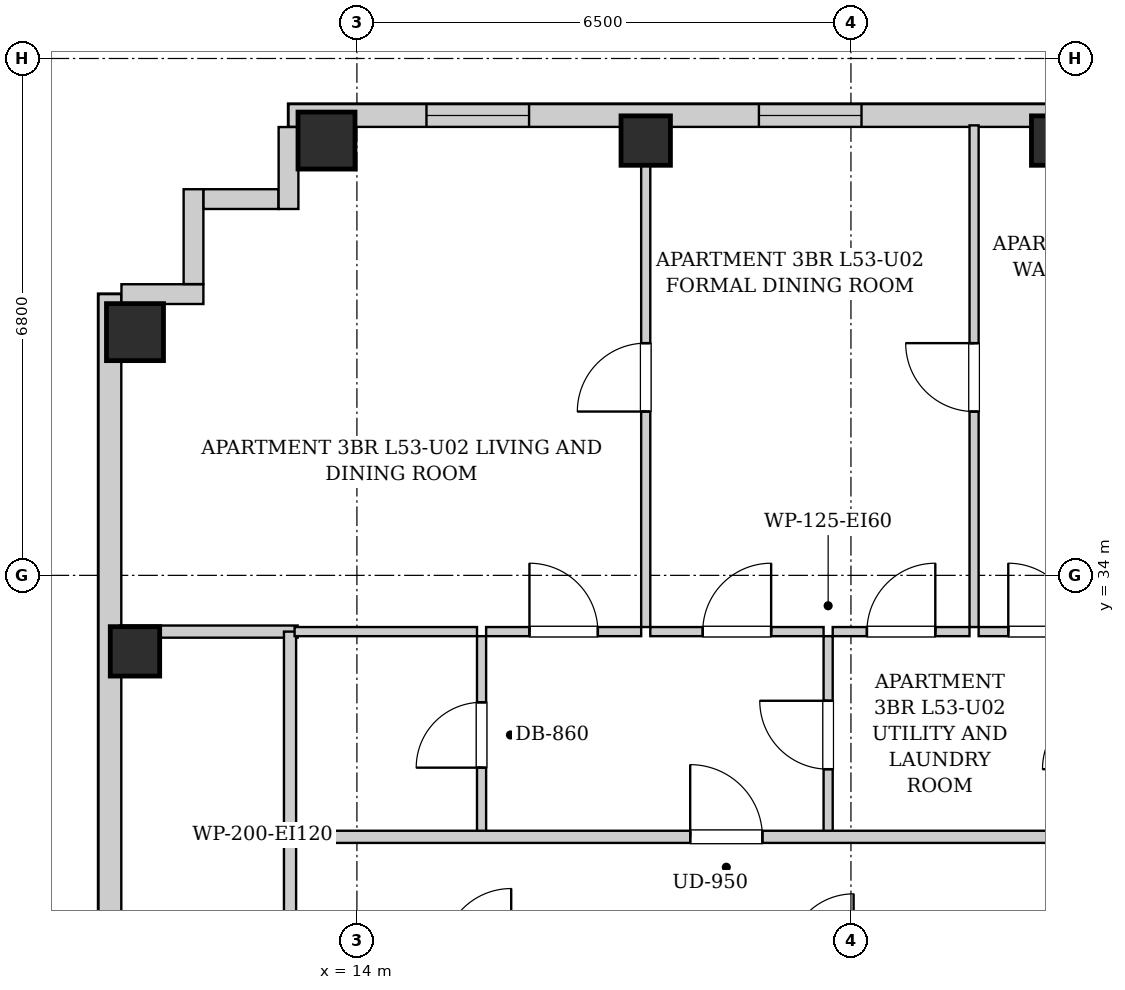
"""IFC4 building model, lengths in metres.
Left out: names, types, materials, properties, quantities, classifications, styles, units other than length and angle.
Written with IfcOpenShell. Run it as: python <this file> out.ifc"""

import sys

from ifc_helpers import new_model, si_unit, direction, frame, frame_2d, origin, origin_2d, place, context, subcontext, project, spatial, rectangle, extrude, element, fill, save


model = new_model("IFC4")
c1 = context("Model", 3, precision=1e-05, world=origin(), true_north=direction((0.0, 1.0)))
c2 = subcontext(c1, "Body", "Model", "MODEL_VIEW")
j1 = project(units=[si_unit("LENGTHUNIT", "METRE"), si_unit("PLANEANGLEUNIT", "RADIAN")], contexts=[c1])
p1 = place(None, origin())
s1 = spatial("IfcSite", under=j1, at=p1, CompositionType="ELEMENT")
p2 = place(p1, origin())
s2 = spatial("IfcBuilding", under=s1, at=p2, CompositionType="ELEMENT")
p3 = place(p2, frame((0.0, 0.0, 184.3)))
s3 = spatial("IfcBuildingStorey", under=s2, at=p3, CompositionType="ELEMENT", Elevation=184.3)
p4 = place(p3, frame((13.6, 39.72, 0.0), z_axis=(0.0, 0.0, 1.0), x_axis=(1.0, 0.0, 0.0)))
e1 = element("IfcColumn", 1, at=p4, inside=s3, PredefinedType="COLUMN", context=c2, shape_type="SweptSolid", body=[
    extrude(rectangle(XDim=0.75, YDim=0.75, at=origin_2d()), origin(), (0.0, 0.0, 1.0), 3.3),
])
for number, where, z_axis, x_axis in (
    (2, (17.8, 39.72, 0.0), (0.0, 0.0, 1.0), (1.0, 0.0, 0.0)),
    (3, (23.2, 39.72, 0.0), (0.0, 0.0, 1.0), (1.0, 0.0, 0.0)),
    (4, (11.08, 33.0, 0.0), (0.0, 0.0, 1.0), (1.0, 0.0, 0.0)),
):
    element("IfcColumn", number, at=place(p3, frame(where, z_axis=z_axis, x_axis=x_axis)), inside=s3, PredefinedType="COLUMN", context=c2, shape_type="SweptSolid", body=[
        extrude(rectangle(XDim=0.65, YDim=0.65, at=origin_2d()), origin(), (0.0, 0.0, 1.0), 3.3),
    ])
p5 = place(p3, frame((11.08, 37.2, 0.0), z_axis=(0.0, 0.0, 1.0), x_axis=(1.0, 0.0, 0.0)))
e5 = element("IfcColumn", 5, at=p5, inside=s3, PredefinedType="COLUMN", context=c2, shape_type="SweptSolid", body=[
    extrude(rectangle(XDim=0.75, YDim=0.75, at=origin_2d()), origin(), (0.0, 0.0, 1.0), 3.3),
])
p6 = place(p3, frame((13.1, 40.05, 0.0), z_axis=(0.0, 0.0, 1.0), x_axis=(1.0, 0.0, 0.0)))
e6 = element("IfcWall", 6, at=p6, inside=s3, PredefinedType="SOLIDWALL", context=c2, shape_type="SweptSolid", body=[
    extrude(rectangle(XDim=17.5, YDim=0.3, at=frame_2d((8.75, 0.0))), origin(), (0.0, 0.0, 1.0), 3.04),
])
p7 = place(p6, frame((1.815, 0.0, 0.55)))
e7 = element("IfcOpeningElement", 7, at=p7, cuts=e6, PredefinedType="OPENING", context=c2, shape_type="SweptSolid", body=[
    extrude(rectangle(XDim=1.35, YDim=1.2, at=frame_2d((0.675, 0.6))), frame((0.0, 0.16, 0.0), z_axis=(0.0, -1.0, 0.0), x_axis=(1.0, 0.0, 0.0)), (0.0, 0.0, 1.0), 0.32),
])
p8 = place(p6, frame((6.189, 0.0, 0.55)))
e8 = element("IfcOpeningElement", 8, at=p8, cuts=e6, PredefinedType="OPENING", context=c2, shape_type="SweptSolid", body=[
    extrude(rectangle(XDim=1.35, YDim=1.2, at=frame_2d((0.675, 0.6))), frame((0.0, 0.16, 0.0), z_axis=(0.0, -1.0, 0.0), x_axis=(1.0, 0.0, 0.0)), (0.0, 0.0, 1.0), 0.32),
])
p9 = place(p6, frame((14.788, 0.0, 0.55)))
e9 = element("IfcOpeningElement", 9, at=p9, cuts=e6, PredefinedType="OPENING", context=c2, shape_type="SweptSolid", body=[
    extrude(rectangle(XDim=1.35, YDim=1.2, at=frame_2d((0.675, 0.6))), frame((0.0, 0.16, 0.0), z_axis=(0.0, -1.0, 0.0), x_axis=(1.0, 0.0, 0.0)), (0.0, 0.0, 1.0), 0.32),
])
p10 = place(p3, frame((10.75, 6.3, 0.0), z_axis=(0.0, 0.0, 1.0), x_axis=(0.0, 1.0, 0.0)))
e10 = element("IfcWall", 10, at=p10, inside=s3, PredefinedType="SOLIDWALL", context=c2, shape_type="SweptSolid", body=[
    extrude(rectangle(XDim=31.4, YDim=0.3, at=frame_2d((15.7, 0.0))), origin(), (0.0, 0.0, 1.0), 3.04),
])
p11 = place(p10, frame((1.653, 0.0, 0.55)))
e11 = element("IfcOpeningElement", 11, at=p11, cuts=e10, PredefinedType="OPENING", context=c2, shape_type="SweptSolid", body=[
    extrude(rectangle(XDim=1.35, YDim=1.2, at=frame_2d((0.675, 0.6))), frame((0.0, 0.16, 0.0), z_axis=(0.0, -1.0, 0.0), x_axis=(1.0, 0.0, 0.0)), (0.0, 0.0, 1.0), 0.32),
])
p12 = place(p10, frame((11.85, 0.0, 0.55)))
e12 = element("IfcOpeningElement", 12, at=p12, cuts=e10, PredefinedType="OPENING", context=c2, shape_type="SweptSolid", body=[
    extrude(rectangle(XDim=1.35, YDim=1.2, at=frame_2d((0.675, 0.6))), frame((0.0, 0.16, 0.0), z_axis=(0.0, -1.0, 0.0), x_axis=(1.0, 0.0, 0.0)), (0.0, 0.0, 1.0), 0.32),
])
p13 = place(p10, frame((9.185, 0.0, 0.55)))
e13 = element("IfcOpeningElement", 13, at=p13, cuts=e10, PredefinedType="OPENING", context=c2, shape_type="SweptSolid", body=[
    extrude(rectangle(XDim=1.35, YDim=1.2, at=frame_2d((0.675, 0.6))), frame((0.0, 0.16, 0.0), z_axis=(0.0, -1.0, 0.0), x_axis=(1.0, 0.0, 0.0)), (0.0, 0.0, 1.0), 0.32),
])
p14 = place(p10, frame((21.209, 0.0, 0.55)))
e14 = element("IfcOpeningElement", 14, at=p14, cuts=e10, PredefinedType="OPENING", context=c2, shape_type="SweptSolid", body=[
    extrude(rectangle(XDim=0.85, YDim=1.2, at=frame_2d((0.425, 0.6))), frame((0.0, 0.16, 0.0), z_axis=(0.0, -1.0, 0.0), x_axis=(1.0, 0.0, 0.0)), (0.0, 0.0, 1.0), 0.32),
])
p15 = place(p3, frame((10.902, 37.7, 0.0), z_axis=(0.0, 0.0, 1.0), x_axis=(1.0, 0.0, 0.0)))
e15 = element("IfcWall", 15, at=p15, inside=s3, PredefinedType="SOLIDWALL", context=c2, shape_type="SweptSolid", body=[
    extrude(rectangle(XDim=1.078, YDim=0.26, at=frame_2d((0.539, 0.0))), origin(), (0.0, 0.0, 1.0), 3.04),
])
p16 = place(p3, frame((11.85, 37.832, 0.0), z_axis=(0.0, 0.0, 1.0), x_axis=(0.0, 1.0, 0.0)))
e16 = element("IfcWall", 16, at=p16, inside=s3, PredefinedType="SOLIDWALL", context=c2, shape_type="SweptSolid", body=[
    extrude(rectangle(XDim=1.248, YDim=0.26, at=frame_2d((0.624, 0.0))), origin(), (0.0, 0.0, 1.0), 3.04),
])
p17 = place(p3, frame((11.982, 38.95, 0.0), z_axis=(0.0, 0.0, 1.0), x_axis=(1.0, 0.0, 0.0)))
e17 = element("IfcWall", 17, at=p17, inside=s3, PredefinedType="SOLIDWALL", context=c2, shape_type="SweptSolid", body=[
    extrude(rectangle(XDim=0.986, YDim=0.26, at=frame_2d((0.493, 0.0))), origin(), (0.0, 0.0, 1.0), 3.04),
])
p18 = place(p3, frame((13.1, 38.82, 0.0), z_axis=(0.0, 0.0, 1.0), x_axis=(0.0, 1.0, 0.0)))
e18 = element("IfcWall", 18, at=p18, inside=s3, PredefinedType="SOLIDWALL", context=c2, shape_type="SweptSolid", body=[
    extrude(rectangle(XDim=1.078, YDim=0.26, at=frame_2d((0.539, 0.0))), origin(), (0.0, 0.0, 1.0), 3.04),
])
p19 = place(p3, frame((13.12, 28.98, 0.0), z_axis=(0.0, 0.0, 1.0), x_axis=(0.0, 1.0, 0.0)))
e19 = element("IfcWall", 19, at=p19, inside=s3, PredefinedType="PARTITIONING", context=c2, shape_type="SweptSolid", body=[
    extrude(rectangle(XDim=1.58, YDim=0.16, at=frame_2d((0.79, 0.0))), origin(), (0.0, 0.0, 1.0), 3.04),
])
p20 = place(p3, frame((10.88, 33.26, 0.0), z_axis=(0.0, 0.0, 1.0), x_axis=(1.0, 0.0, 0.0)))
e20 = element("IfcWall", 20, at=p20, inside=s3, PredefinedType="PARTITIONING", context=c2, shape_type="SweptSolid", body=[
    extrude(rectangle(XDim=2.34, YDim=0.16, at=frame_2d((1.17, 0.0))), origin(), (0.0, 0.0, 1.0), 3.04),
])
p21 = place(p3, frame((13.12, 30.6, 0.0), z_axis=(0.0, 0.0, 1.0), x_axis=(0.0, 1.0, 0.0)))
e21 = element("IfcWall", 21, at=p21, inside=s3, PredefinedType="PARTITIONING", context=c2, shape_type="SweptSolid", body=[
    extrude(rectangle(XDim=2.66, YDim=0.16, at=frame_2d((1.33, 0.0))), origin(), (0.0, 0.0, 1.0), 3.04),
])
p22 = place(p3, frame((15.64, 30.6, 0.0), z_axis=(0.0, 0.0, 1.0), x_axis=(0.0, 1.0, 0.0)))
e22 = element("IfcWall", 22, at=p22, inside=s3, PredefinedType="PARTITIONING", context=c2, shape_type="SweptSolid", body=[
    extrude(rectangle(XDim=2.6, YDim=0.12, at=frame_2d((1.3, 0.0))), origin(), (0.0, 0.0, 1.0), 3.04),
])
p23 = place(p22, frame((0.87, 0.0, 0.0)))
e23 = element("IfcOpeningElement", 23, at=p23, cuts=e22, PredefinedType="OPENING", context=c2, shape_type="SweptSolid", body=[
    extrude(rectangle(XDim=0.86, YDim=2.05, at=frame_2d((0.43, 1.025))), frame((0.0, 0.07, 0.0), z_axis=(0.0, -1.0, 0.0), x_axis=(1.0, 0.0, 0.0)), (0.0, 0.0, 1.0), 0.14),
])
p24 = place(p3, frame((13.18, 33.26, 0.0), z_axis=(0.0, 0.0, 1.0), x_axis=(1.0, 0.0, 0.0)))
e24 = element("IfcWall", 24, at=p24, inside=s3, PredefinedType="PARTITIONING", context=c2, shape_type="SweptSolid", body=[
    extrude(rectangle(XDim=2.4, YDim=0.12, at=frame_2d((1.2, 0.0))), origin(), (0.0, 0.0, 1.0), 3.04),
])
p25 = place(p3, frame((20.2, 30.6, 0.0), z_axis=(0.0, 0.0, 1.0), x_axis=(0.0, 1.0, 0.0)))
e25 = element("IfcWall", 25, at=p25, inside=s3, PredefinedType="PARTITIONING", context=c2, shape_type="SweptSolid", body=[
    extrude(rectangle(XDim=2.6, YDim=0.12, at=frame_2d((1.3, 0.0))), origin(), (0.0, 0.0, 1.0), 3.04),
])
p26 = place(p25, frame((0.85, 0.0, 0.0)))
e26 = element("IfcOpeningElement", 26, at=p26, cuts=e25, PredefinedType="OPENING", context=c2, shape_type="SweptSolid", body=[
    extrude(rectangle(XDim=0.9, YDim=2.05, at=frame_2d((0.45, 1.025))), frame((0.0, 0.07, 0.0), z_axis=(0.0, -1.0, 0.0), x_axis=(1.0, 0.0, 0.0)), (0.0, 0.0, 1.0), 0.14),
])
p27 = place(p3, frame((15.7, 33.26, 0.0), z_axis=(0.0, 0.0, 1.0), x_axis=(1.0, 0.0, 0.0)))
e27 = element("IfcWall", 27, at=p27, inside=s3, PredefinedType="PARTITIONING", context=c2, shape_type="SweptSolid", body=[
    extrude(rectangle(XDim=2.04, YDim=0.12, at=frame_2d((1.02, 0.0))), origin(), (0.0, 0.0, 1.0), 3.04),
])
p28 = place(p27, frame((0.57, 0.0, 0.0)))
e28 = element("IfcOpeningElement", 28, at=p28, cuts=e27, PredefinedType="OPENING", context=c2, shape_type="SweptSolid", body=[
    extrude(rectangle(XDim=0.9, YDim=2.05, at=frame_2d((0.45, 1.025))), frame((0.0, 0.07, 0.0), z_axis=(0.0, -1.0, 0.0), x_axis=(1.0, 0.0, 0.0)), (0.0, 0.0, 1.0), 0.14),
])
p29 = place(p3, frame((17.86, 33.26, 0.0), z_axis=(0.0, 0.0, 1.0), x_axis=(1.0, 0.0, 0.0)))
e29 = element("IfcWall", 29, at=p29, inside=s3, PredefinedType="PARTITIONING", context=c2, shape_type="SweptSolid", body=[
    extrude(rectangle(XDim=2.28, YDim=0.12, at=frame_2d((1.14, 0.0))), origin(), (0.0, 0.0, 1.0), 3.04),
])
p30 = place(p29, frame((0.69, 0.0, 0.0)))
e30 = element("IfcOpeningElement", 30, at=p30, cuts=e29, PredefinedType="OPENING", context=c2, shape_type="SweptSolid", body=[
    extrude(rectangle(XDim=0.9, YDim=2.05, at=frame_2d((0.45, 1.025))), frame((0.0, 0.07, 0.0), z_axis=(0.0, -1.0, 0.0), x_axis=(1.0, 0.0, 0.0)), (0.0, 0.0, 1.0), 0.14),
])
p31 = place(p3, frame((20.26, 33.26, 0.0), z_axis=(0.0, 0.0, 1.0), x_axis=(1.0, 0.0, 0.0)))
e31 = element("IfcWall", 31, at=p31, inside=s3, PredefinedType="PARTITIONING", context=c2, shape_type="SweptSolid", body=[
    extrude(rectangle(XDim=1.8, YDim=0.12, at=frame_2d((0.9, 0.0))), origin(), (0.0, 0.0, 1.0), 3.04),
])
p32 = place(p31, frame((0.45, 0.0, 0.0)))
e32 = element("IfcOpeningElement", 32, at=p32, cuts=e31, PredefinedType="OPENING", context=c2, shape_type="SweptSolid", body=[
    extrude(rectangle(XDim=0.9, YDim=2.05, at=frame_2d((0.45, 1.025))), frame((0.0, 0.07, 0.0), z_axis=(0.0, -1.0, 0.0), x_axis=(1.0, 0.0, 0.0)), (0.0, 0.0, 1.0), 0.14),
])
p33 = place(p3, frame((22.18, 33.26, 0.0), z_axis=(0.0, 0.0, 1.0), x_axis=(1.0, 0.0, 0.0)))
e33 = element("IfcWall", 33, at=p33, inside=s3, PredefinedType="PARTITIONING", context=c2, shape_type="SweptSolid", body=[
    extrude(rectangle(XDim=1.68, YDim=0.12, at=frame_2d((0.84, 0.0))), origin(), (0.0, 0.0, 1.0), 3.04),
])
p34 = place(p33, frame((0.39, 0.0, 0.0)))
e34 = element("IfcOpeningElement", 34, at=p34, cuts=e33, PredefinedType="OPENING", context=c2, shape_type="SweptSolid", body=[
    extrude(rectangle(XDim=0.9, YDim=2.05, at=frame_2d((0.45, 1.025))), frame((0.0, 0.07, 0.0), z_axis=(0.0, -1.0, 0.0), x_axis=(1.0, 0.0, 0.0)), (0.0, 0.0, 1.0), 0.14),
])
p35 = place(p3, frame((17.8, 33.32, 0.0), z_axis=(0.0, 0.0, 1.0), x_axis=(0.0, 1.0, 0.0)))
e35 = element("IfcWall", 35, at=p35, inside=s3, PredefinedType="PARTITIONING", context=c2, shape_type="SweptSolid", body=[
    extrude(rectangle(XDim=6.6, YDim=0.12, at=frame_2d((3.3, 0.0))), origin(), (0.0, 0.0, 1.0), 2.556),
])
p36 = place(p35, frame((2.835, 0.0, 0.0)))
e36 = element("IfcOpeningElement", 36, at=p36, cuts=e35, PredefinedType="OPENING", context=c2, shape_type="SweptSolid", body=[
    extrude(rectangle(XDim=0.9, YDim=2.05, at=frame_2d((0.45, 1.025))), frame((0.0, 0.07, 0.0), z_axis=(0.0, -1.0, 0.0), x_axis=(1.0, 0.0, 0.0)), (0.0, 0.0, 1.0), 0.14),
])
p37 = place(p3, frame((22.12, 33.32, 0.0), z_axis=(0.0, 0.0, 1.0), x_axis=(0.0, 1.0, 0.0)))
e37 = element("IfcWall", 37, at=p37, inside=s3, PredefinedType="PARTITIONING", context=c2, shape_type="SweptSolid", body=[
    extrude(rectangle(XDim=6.6, YDim=0.12, at=frame_2d((3.3, 0.0))), origin(), (0.0, 0.0, 1.0), 3.04),
])
p38 = place(p37, frame((2.835, 0.0, 0.0)))
e38 = element("IfcOpeningElement", 38, at=p38, cuts=e37, PredefinedType="OPENING", context=c2, shape_type="SweptSolid", body=[
    extrude(rectangle(XDim=0.9, YDim=2.05, at=frame_2d((0.45, 1.025))), frame((0.0, 0.07, 0.0), z_axis=(0.0, -1.0, 0.0), x_axis=(1.0, 0.0, 0.0)), (0.0, 0.0, 1.0), 0.14),
])
p39 = place(p3, frame((13.15, 30.56, 0.0), z_axis=(0.0, 0.0, 1.0), x_axis=(1.0, 0.0, 0.0)))
e39 = element("IfcWall", 39, at=p39, inside=s3, PredefinedType="PARTITIONING", context=c2, shape_type="SweptSolid", body=[
    extrude(rectangle(XDim=24.6, YDim=0.16, at=frame_2d((12.3, 0.0))), origin(), (0.0, 0.0, 1.0), 3.04),
])
p40 = place(p39, frame((5.235, 0.0, 0.0)))
e40 = element("IfcOpeningElement", 40, at=p40, cuts=e39, PredefinedType="OPENING", context=c2, shape_type="SweptSolid", body=[
    extrude(rectangle(XDim=0.95, YDim=2.1, at=frame_2d((0.475, 1.05))), frame((0.0, 0.09, 0.0), z_axis=(0.0, -1.0, 0.0), x_axis=(1.0, 0.0, 0.0)), (0.0, 0.0, 1.0), 0.18),
])
p41 = place(p23, origin())
e41 = element("IfcDoor", 41, at=p41, inside=s3, OperationType="SINGLE_SWING_LEFT", PredefinedType="DOOR", context=c2, shape_type="SweptSolid", body=[
    extrude(rectangle(XDim=0.86, YDim=2.05, at=frame_2d((0.43, 1.025))), frame((0.0, 0.025, 0.0), z_axis=(0.0, -1.0, 0.0), x_axis=(1.0, 0.0, 0.0)), (0.0, 0.0, 1.0), 0.05),
])
fill(e23, e41)
p42 = place(p26, origin())
e42 = element("IfcDoor", 42, at=p42, inside=s3, OperationType="SINGLE_SWING_RIGHT", PredefinedType="DOOR", context=c2, shape_type="SweptSolid", body=[
    extrude(rectangle(XDim=0.9, YDim=2.05, at=frame_2d((0.45, 1.025))), frame((0.0, 0.025, 0.0), z_axis=(0.0, -1.0, 0.0), x_axis=(1.0, 0.0, 0.0)), (0.0, 0.0, 1.0), 0.05),
])
fill(e26, e42)
p43 = place(p28, origin())
e43 = element("IfcDoor", 43, at=p43, inside=s3, OperationType="SINGLE_SWING_LEFT", PredefinedType="DOOR", context=c2, shape_type="SweptSolid", body=[
    extrude(rectangle(XDim=0.9, YDim=2.05, at=frame_2d((0.45, 1.025))), frame((0.0, 0.025, 0.0), z_axis=(0.0, -1.0, 0.0), x_axis=(1.0, 0.0, 0.0)), (0.0, 0.0, 1.0), 0.05),
])
fill(e28, e43)
p44 = place(p30, origin())
e44 = element("IfcDoor", 44, at=p44, inside=s3, OperationType="SINGLE_SWING_RIGHT", PredefinedType="DOOR", context=c2, shape_type="SweptSolid", body=[
    extrude(rectangle(XDim=0.9, YDim=2.05, at=frame_2d((0.45, 1.025))), frame((0.0, 0.025, 0.0), z_axis=(0.0, -1.0, 0.0), x_axis=(1.0, 0.0, 0.0)), (0.0, 0.0, 1.0), 0.05),
])
fill(e30, e44)
p45 = place(p32, origin())
e45 = element("IfcDoor", 45, at=p45, inside=s3, OperationType="SINGLE_SWING_RIGHT", PredefinedType="DOOR", context=c2, shape_type="SweptSolid", body=[
    extrude(rectangle(XDim=0.9, YDim=2.05, at=frame_2d((0.45, 1.025))), frame((0.0, 0.025, 0.0), z_axis=(0.0, -1.0, 0.0), x_axis=(1.0, 0.0, 0.0)), (0.0, 0.0, 1.0), 0.05),
])
fill(e32, e45)
p46 = place(p34, origin())
e46 = element("IfcDoor", 46, at=p46, inside=s3, OperationType="SINGLE_SWING_LEFT", PredefinedType="DOOR", context=c2, shape_type="SweptSolid", body=[
    extrude(rectangle(XDim=0.9, YDim=2.05, at=frame_2d((0.45, 1.025))), frame((0.0, 0.025, 0.0), z_axis=(0.0, -1.0, 0.0), x_axis=(1.0, 0.0, 0.0)), (0.0, 0.0, 1.0), 0.05),
])
fill(e34, e46)
p47 = place(p36, origin())
e47 = element("IfcDoor", 47, at=p47, inside=s3, OperationType="SINGLE_SWING_LEFT", PredefinedType="DOOR", context=c2, shape_type="SweptSolid", body=[
    extrude(rectangle(XDim=0.9, YDim=2.05, at=frame_2d((0.45, 1.025))), frame((0.0, 0.025, 0.0), z_axis=(0.0, -1.0, 0.0), x_axis=(1.0, 0.0, 0.0)), (0.0, 0.0, 1.0), 0.05),
])
fill(e36, e47)
p48 = place(p38, origin())
e48 = element("IfcDoor", 48, at=p48, inside=s3, OperationType="SINGLE_SWING_RIGHT", PredefinedType="DOOR", context=c2, shape_type="SweptSolid", body=[
    extrude(rectangle(XDim=0.9, YDim=2.05, at=frame_2d((0.45, 1.025))), frame((0.0, 0.025, 0.0), z_axis=(0.0, -1.0, 0.0), x_axis=(1.0, 0.0, 0.0)), (0.0, 0.0, 1.0), 0.05),
])
fill(e38, e48)
p49 = place(p40, origin())
e49 = element("IfcDoor", 49, at=p49, inside=s3, OperationType="SINGLE_SWING_LEFT", PredefinedType="DOOR", context=c2, shape_type="SweptSolid", body=[
    extrude(rectangle(XDim=0.95, YDim=2.1, at=frame_2d((0.475, 1.05))), frame((0.0, 0.025, 0.0), z_axis=(0.0, -1.0, 0.0), x_axis=(1.0, 0.0, 0.0)), (0.0, 0.0, 1.0), 0.05),
])
fill(e40, e49)
p50 = place(p7, origin())
e50 = element("IfcWindow", 50, at=p50, inside=s3, PartitioningType="SINGLE_PANEL", PredefinedType="WINDOW", context=c2, shape_type="SweptSolid", body=[
    extrude(rectangle(XDim=1.35, YDim=1.2, at=frame_2d((0.675, 0.6))), frame((0.0, 0.03, 0.0), z_axis=(0.0, -1.0, 0.0), x_axis=(1.0, 0.0, 0.0)), (0.0, 0.0, 1.0), 0.06),
])
fill(e7, e50)
p51 = place(p8, origin())
e51 = element("IfcWindow", 51, at=p51, inside=s3, PartitioningType="SINGLE_PANEL", PredefinedType="WINDOW", context=c2, shape_type="SweptSolid", body=[
    extrude(rectangle(XDim=1.35, YDim=1.2, at=frame_2d((0.675, 0.6))), frame((0.0, 0.03, 0.0), z_axis=(0.0, -1.0, 0.0), x_axis=(1.0, 0.0, 0.0)), (0.0, 0.0, 1.0), 0.06),
])
fill(e8, e51)
save(model, sys.argv[1])
